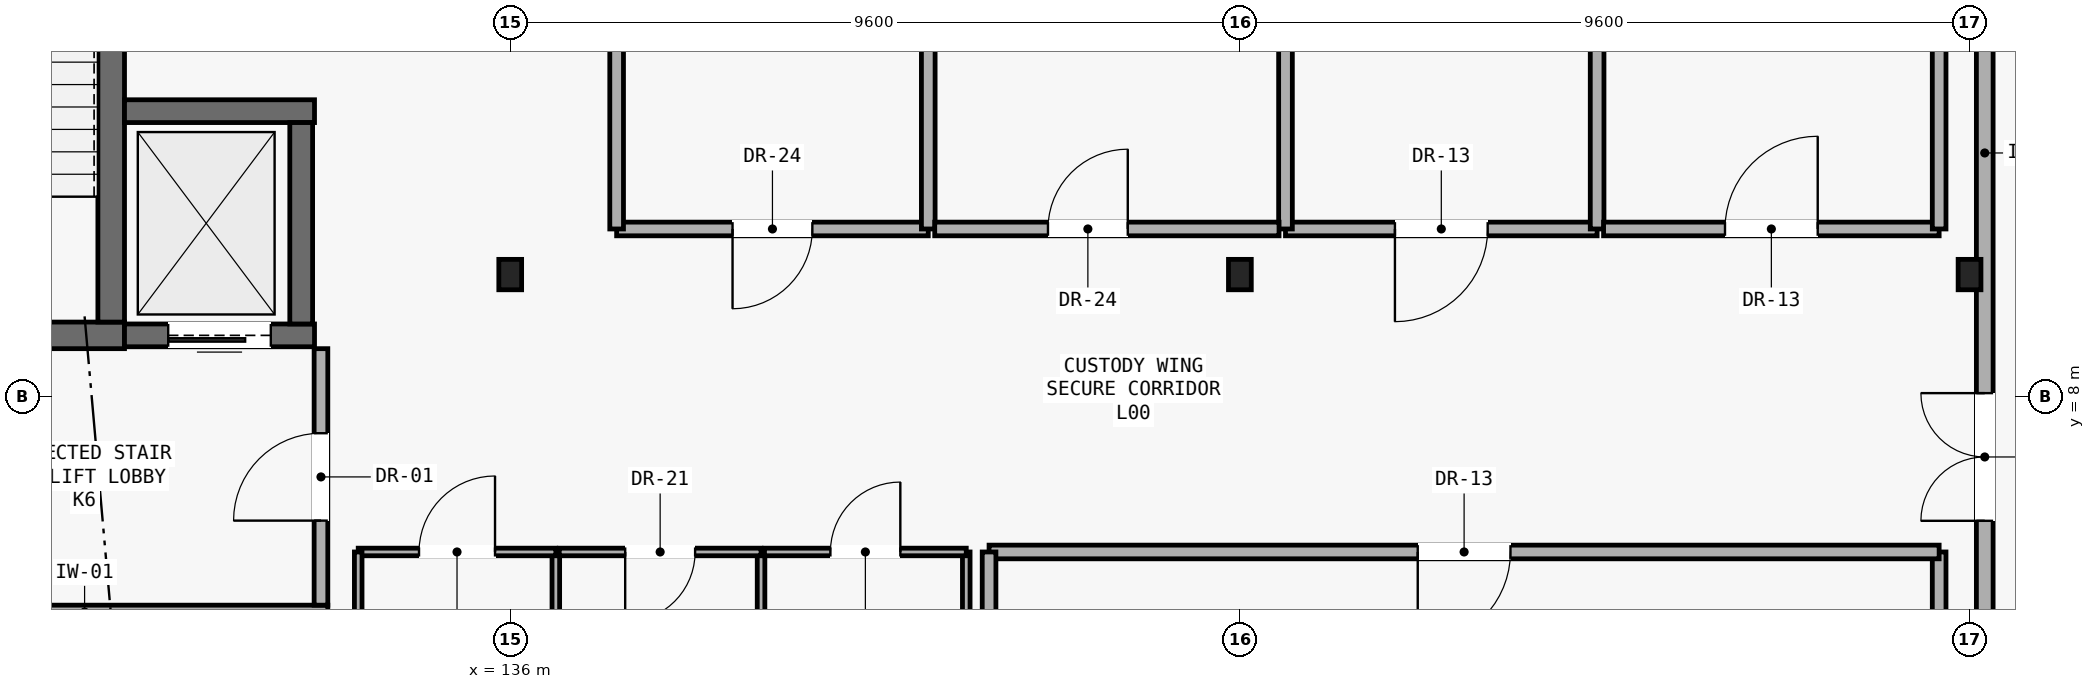
"""IFC4 building model, lengths in metres.
Left out: names, types, materials, properties, quantities, classifications, styles, units other than length and angle.
Written with IfcOpenShell. Run it as: python <this file> out.ifc"""

import sys

from ifc_helpers import new_model, si_unit, direction, frame, frame_2d, origin, origin_2d, place, context, subcontext, project, spatial, rectangle, i_section, extrude, element, fill, save


model = new_model("IFC4")
c1 = context("Model", 3, precision=1e-05, world=origin(), true_north=direction((0.0, 1.0)))
c2 = subcontext(c1, "Body", "Model", "MODEL_VIEW")
j1 = project(units=[si_unit("LENGTHUNIT", "METRE"), si_unit("PLANEANGLEUNIT", "RADIAN")], contexts=[c1])
p1 = place(None, origin())
s1 = spatial("IfcSite", under=j1, at=p1, CompositionType="ELEMENT")
p2 = place(p1, origin())
s2 = spatial("IfcBuilding", under=s1, at=p2, CompositionType="ELEMENT")
p3 = place(p2, origin())
s3 = spatial("IfcBuildingStorey", under=s2, at=p3, CompositionType="ELEMENT", Elevation=0.0)
for number, where, z_axis, x_axis in (
    (1, (136.0, 9.6, -0.27), (0.0, 0.0, 1.0), (1.0, 0.0, 0.0)),
    (2, (145.6, 9.6, -0.27), (0.0, 0.0, 1.0), (1.0, 0.0, 0.0)),
    (3, (155.2, 9.6, -0.27), (0.0, 0.0, 1.0), (1.0, 0.0, 0.0)),
):
    element("IfcColumn", number, at=place(p3, frame(where, z_axis=z_axis, x_axis=x_axis)), inside=s3, PredefinedType="COLUMN", context=c2, shape_type="SweptSolid", body=[
        extrude(i_section(OverallWidth=0.3, OverallDepth=0.4, WebThickness=0.013, FlangeThickness=0.024, FilletRadius=0.027, at=origin_2d()), origin(), (0.0, 0.0, 1.0), 5.52),
    ])
p4 = place(p3, frame((127.025, 8.8, -0.27), z_axis=(0.0, 0.0, 1.0), x_axis=(1.0, 0.0, 0.0)))
e4 = element("IfcWall", 4, at=p4, inside=s3, PredefinedType="SHEAR", context=c2, shape_type="SweptSolid", body=[
    extrude(rectangle(XDim=3.9, YDim=0.35, at=frame_2d((1.95, 0.0))), origin(), (0.0, 0.0, 1.0), 5.27),
])
p5 = place(p4, frame((1.125, 0.0, 0.27)))
e5 = element("IfcOpeningElement", 5, at=p5, cuts=e4, PredefinedType="OPENING", context=c2, shape_type="SweptSolid", body=[
    extrude(rectangle(XDim=1.3, YDim=2.15, at=frame_2d((0.65, 1.075))), frame((0.0, 0.185, 0.0), z_axis=(0.0, -1.0, 0.0), x_axis=(1.0, 0.0, 0.0)), (0.0, 0.0, 1.0), 0.37),
])
p6 = place(p3, frame((130.75, 8.975, -0.27), z_axis=(0.0, 0.0, 1.0), x_axis=(0.0, 1.0, 0.0)))
e6 = element("IfcWall", 6, at=p6, inside=s3, PredefinedType="SHEAR", context=c2, shape_type="SweptSolid", body=[
    extrude(rectangle(XDim=7.6, YDim=0.35, at=frame_2d((3.8, 0.0))), origin(), (0.0, 0.0, 1.0), 5.27),
])
p7 = place(p3, frame((130.925, 8.8, -0.27), z_axis=(0.0, 0.0, 1.0), x_axis=(1.0, 0.0, 0.0)))
e7 = element("IfcWall", 7, at=p7, inside=s3, PredefinedType="SHEAR", context=c2, shape_type="SweptSolid", body=[
    extrude(rectangle(XDim=2.5, YDim=0.3, at=frame_2d((1.25, 0.0))), origin(), (0.0, 0.0, 1.0), 5.27),
])
p8 = place(p7, frame((0.575, 0.0, 0.27)))
e8 = element("IfcOpeningElement", 8, at=p8, cuts=e7, PredefinedType="OPENING", context=c2, shape_type="SweptSolid", body=[
    extrude(rectangle(XDim=1.35, YDim=2.15, at=frame_2d((0.675, 1.075))), frame((0.0, 0.16, 0.0), z_axis=(0.0, -1.0, 0.0), x_axis=(1.0, 0.0, 0.0)), (0.0, 0.0, 1.0), 0.32),
])
p9 = place(p3, frame((130.925, 11.75, -0.27), z_axis=(0.0, 0.0, 1.0), x_axis=(1.0, 0.0, 0.0)))
e9 = element("IfcWall", 9, at=p9, inside=s3, PredefinedType="SHEAR", context=c2, shape_type="SweptSolid", body=[
    extrude(rectangle(XDim=2.5, YDim=0.3, at=frame_2d((1.25, 0.0))), origin(), (0.0, 0.0, 1.0), 5.27),
])
p10 = place(p3, frame((133.25, 8.95, -0.27), z_axis=(0.0, 0.0, 1.0), x_axis=(0.0, 1.0, 0.0)))
e10 = element("IfcWall", 10, at=p10, inside=s3, PredefinedType="SHEAR", context=c2, shape_type="SweptSolid", body=[
    extrude(rectangle(XDim=2.65, YDim=0.3, at=frame_2d((1.325, 0.0))), origin(), (0.0, 0.0, 1.0), 5.27),
])
p11 = place(p3, frame((127.2, 5.16, 0.0), z_axis=(0.0, 0.0, 1.0), x_axis=(1.0, 0.0, 0.0)))
e11 = element("IfcWall", 11, at=p11, inside=s3, PredefinedType="PARTITIONING", context=c2, shape_type="SweptSolid", body=[
    extrude(rectangle(XDim=6.4, YDim=0.18, at=frame_2d((3.2, 0.0))), origin(), (0.0, 0.0, 1.0), 5.0),
])
p12 = place(p3, frame((133.51, 5.25, 0.0), z_axis=(0.0, 0.0, 1.0), x_axis=(0.0, 1.0, 0.0)))
e12 = element("IfcWall", 12, at=p12, inside=s3, PredefinedType="PARTITIONING", context=c2, shape_type="SweptSolid", body=[
    extrude(rectangle(XDim=3.375, YDim=0.18, at=frame_2d((1.688, 0.0))), origin(), (0.0, 0.0, 1.0), 5.0),
])
p13 = place(p12, frame((1.113, 0.0, 0.0)))
e13 = element("IfcOpeningElement", 13, at=p13, cuts=e12, PredefinedType="OPENING", context=c2, shape_type="SweptSolid", body=[
    extrude(rectangle(XDim=1.15, YDim=2.15, at=frame_2d((0.575, 1.075))), frame((0.0, 0.1, 0.0), z_axis=(0.0, -1.0, 0.0), x_axis=(1.0, 0.0, 0.0)), (0.0, 0.0, 1.0), 0.2),
])
p14 = place(p3, frame((155.4, 22.215, 0.0), z_axis=(0.0, 0.0, 1.0), x_axis=(0.0, -1.0, 0.0)))
e14 = element("IfcWall", 14, at=p14, inside=s3, PredefinedType="PARTITIONING", context=c2, shape_type="SweptSolid", body=[
    extrude(rectangle(XDim=22.03, YDim=0.22, at=frame_2d((11.015, 0.0))), origin(), (0.0, 0.0, 1.0), 4.54),
])
p15 = place(p14, frame((14.175, 0.0, 0.0)))
e15 = element("IfcOpeningElement", 15, at=p15, cuts=e14, PredefinedType="OPENING", context=c2, shape_type="SweptSolid", body=[
    extrude(rectangle(XDim=1.68, YDim=2.2, at=frame_2d((0.84, 1.1))), frame((0.0, 0.12, 0.0), z_axis=(0.0, -1.0, 0.0), x_axis=(1.0, 0.0, 0.0)), (0.0, 0.0, 1.0), 0.24),
])
p16 = place(p3, frame((154.8, 0.185, 0.0), z_axis=(0.0, 0.0, 1.0), x_axis=(0.0, 1.0, 0.0)))
e16 = element("IfcWall", 16, at=p16, inside=s3, PredefinedType="PARTITIONING", context=c2, shape_type="SweptSolid", body=[
    extrude(rectangle(XDim=5.765, YDim=0.18, at=frame_2d((2.882, 0.0))), origin(), (0.0, 0.0, 1.0), 5.0),
])
p17 = place(p3, frame((154.8, 5.95, 0.0), z_axis=(0.0, 0.0, 1.0), x_axis=(-1.0, 0.0, 0.0)))
e17 = element("IfcWall", 17, at=p17, inside=s3, PredefinedType="PARTITIONING", context=c2, shape_type="SweptSolid", body=[
    extrude(rectangle(XDim=12.5, YDim=0.18, at=frame_2d((6.25, 0.0))), origin(), (0.0, 0.0, 1.0), 5.0),
])
p18 = place(p17, frame((5.64, 0.0, 0.0)))
e18 = element("IfcOpeningElement", 18, at=p18, cuts=e17, PredefinedType="OPENING", context=c2, shape_type="SweptSolid", body=[
    extrude(rectangle(XDim=1.22, YDim=2.1, at=frame_2d((0.61, 1.05))), frame((0.0, 0.1, 0.0), z_axis=(0.0, -1.0, 0.0), x_axis=(1.0, 0.0, 0.0)), (0.0, 0.0, 1.0), 0.2),
])
p19 = place(p3, frame((142.3, 5.95, 0.0), z_axis=(0.0, 0.0, 1.0), x_axis=(0.0, -1.0, 0.0)))
e19 = element("IfcWall", 19, at=p19, inside=s3, PredefinedType="PARTITIONING", context=c2, shape_type="SweptSolid", body=[
    extrude(rectangle(XDim=5.765, YDim=0.18, at=frame_2d((2.882, 0.0))), origin(), (0.0, 0.0, 1.0), 5.0),
])
p20 = place(p3, frame((146.2, 10.2, 0.0), z_axis=(0.0, 0.0, 1.0), x_axis=(1.0, 0.0, 0.0)))
e20 = element("IfcWall", 20, at=p20, inside=s3, PredefinedType="PARTITIONING", context=c2, shape_type="SweptSolid", body=[
    extrude(rectangle(XDim=4.1, YDim=0.18, at=frame_2d((2.05, 0.0))), origin(), (0.0, 0.0, 1.0), 5.0),
])
p21 = place(p20, frame((1.44, 0.0, 0.0)))
e21 = element("IfcOpeningElement", 21, at=p21, cuts=e20, PredefinedType="OPENING", context=c2, shape_type="SweptSolid", body=[
    extrude(rectangle(XDim=1.22, YDim=2.1, at=frame_2d((0.61, 1.05))), frame((0.0, 0.1, 0.0), z_axis=(0.0, -1.0, 0.0), x_axis=(1.0, 0.0, 0.0)), (0.0, 0.0, 1.0), 0.2),
])
for number, where, z_axis, x_axis in (
    (22, (150.3, 10.2, 0.0), (0.0, 0.0, 1.0), (0.0, 1.0, 0.0)),
    (23, (146.2, 22.215, 0.0), (0.0, 0.0, 1.0), (0.0, -1.0, 0.0)),
):
    element("IfcWall", number, at=place(p3, frame(where, z_axis=z_axis, x_axis=x_axis)), inside=s3, PredefinedType="PARTITIONING", context=c2, shape_type="SweptSolid", body=[
        extrude(rectangle(XDim=12.015, YDim=0.18, at=frame_2d((6.008, 0.0))), origin(), (0.0, 0.0, 1.0), 5.0),
    ])
p22 = place(p3, frame((150.385, 10.2, 0.0), z_axis=(0.0, 0.0, 1.0), x_axis=(1.0, 0.0, 0.0)))
e24 = element("IfcWall", 24, at=p22, inside=s3, PredefinedType="PARTITIONING", context=c2, shape_type="SweptSolid", body=[
    extrude(rectangle(XDim=4.415, YDim=0.18, at=frame_2d((2.208, 0.0))), origin(), (0.0, 0.0, 1.0), 5.0),
])
p23 = place(p22, frame((1.597, 0.0, 0.0)))
e25 = element("IfcOpeningElement", 25, at=p23, cuts=e24, PredefinedType="OPENING", context=c2, shape_type="SweptSolid", body=[
    extrude(rectangle(XDim=1.22, YDim=2.1, at=frame_2d((0.61, 1.05))), frame((0.0, 0.1, 0.0), z_axis=(0.0, -1.0, 0.0), x_axis=(1.0, 0.0, 0.0)), (0.0, 0.0, 1.0), 0.2),
])
p24 = place(p3, frame((154.8, 10.2, 0.0), z_axis=(0.0, 0.0, 1.0), x_axis=(0.0, 1.0, 0.0)))
e26 = element("IfcWall", 26, at=p24, inside=s3, PredefinedType="PARTITIONING", context=c2, shape_type="SweptSolid", body=[
    extrude(rectangle(XDim=12.015, YDim=0.18, at=frame_2d((6.008, 0.0))), origin(), (0.0, 0.0, 1.0), 5.0),
])
p25 = place(p3, frame((137.4, 10.2, 0.0), z_axis=(0.0, 0.0, 1.0), x_axis=(1.0, 0.0, 0.0)))
e27 = element("IfcWall", 27, at=p25, inside=s3, PredefinedType="PARTITIONING", context=c2, shape_type="SweptSolid", body=[
    extrude(rectangle(XDim=4.1, YDim=0.18, at=frame_2d((2.05, 0.0))), origin(), (0.0, 0.0, 1.0), 5.0),
])
p26 = place(p25, frame((1.525, 0.0, 0.0)))
e28 = element("IfcOpeningElement", 28, at=p26, cuts=e27, PredefinedType="OPENING", context=c2, shape_type="SweptSolid", body=[
    extrude(rectangle(XDim=1.05, YDim=2.1, at=frame_2d((0.525, 1.05))), frame((0.0, 0.1, 0.0), z_axis=(0.0, -1.0, 0.0), x_axis=(1.0, 0.0, 0.0)), (0.0, 0.0, 1.0), 0.2),
])
for number, where, z_axis, x_axis in (
    (29, (141.5, 10.2, 0.0), (0.0, 0.0, 1.0), (0.0, 1.0, 0.0)),
    (30, (137.4, 22.215, 0.0), (0.0, 0.0, 1.0), (0.0, -1.0, 0.0)),
):
    element("IfcWall", number, at=place(p3, frame(where, z_axis=z_axis, x_axis=x_axis)), inside=s3, PredefinedType="PARTITIONING", context=c2, shape_type="SweptSolid", body=[
        extrude(rectangle(XDim=12.015, YDim=0.18, at=frame_2d((6.008, 0.0))), origin(), (0.0, 0.0, 1.0), 5.0),
    ])
p27 = place(p3, frame((141.585, 10.2, 0.0), z_axis=(0.0, 0.0, 1.0), x_axis=(1.0, 0.0, 0.0)))
e31 = element("IfcWall", 31, at=p27, inside=s3, PredefinedType="PARTITIONING", context=c2, shape_type="SweptSolid", body=[
    extrude(rectangle(XDim=4.53, YDim=0.18, at=frame_2d((2.265, 0.0))), origin(), (0.0, 0.0, 1.0), 5.0),
])
p28 = place(p27, frame((1.49, 0.0, 0.0)))
e32 = element("IfcOpeningElement", 32, at=p28, cuts=e31, PredefinedType="OPENING", context=c2, shape_type="SweptSolid", body=[
    extrude(rectangle(XDim=1.05, YDim=2.1, at=frame_2d((0.525, 1.05))), frame((0.0, 0.1, 0.0), z_axis=(0.0, -1.0, 0.0), x_axis=(1.0, 0.0, 0.0)), (0.0, 0.0, 1.0), 0.2),
])
p29 = place(p3, frame((136.6, 2.65, 0.0), z_axis=(0.0, 0.0, 1.0), x_axis=(0.0, 1.0, 0.0)))
e33 = element("IfcWall", 33, at=p29, inside=s3, PredefinedType="PARTITIONING", context=c2, shape_type="SweptSolid", body=[
    extrude(rectangle(XDim=3.3, YDim=0.1, at=frame_2d((1.65, 0.0))), origin(), (0.0, 0.0, 1.0), 5.0),
])
p30 = place(p3, frame((136.6, 5.95, 0.0), z_axis=(0.0, 0.0, 1.0), x_axis=(-1.0, 0.0, 0.0)))
e34 = element("IfcWall", 34, at=p30, inside=s3, PredefinedType="PARTITIONING", context=c2, shape_type="SweptSolid", body=[
    extrude(rectangle(XDim=2.6, YDim=0.1, at=frame_2d((1.3, 0.0))), origin(), (0.0, 0.0, 1.0), 5.0),
])
p31 = place(p30, frame((0.8, 0.0, 0.0)))
e35 = element("IfcOpeningElement", 35, at=p31, cuts=e34, PredefinedType="OPENING", context=c2, shape_type="SweptSolid", body=[
    extrude(rectangle(XDim=1.0, YDim=2.08, at=frame_2d((0.5, 1.04))), frame((0.0, 0.06, 0.0), z_axis=(0.0, -1.0, 0.0), x_axis=(1.0, 0.0, 0.0)), (0.0, 0.0, 1.0), 0.12),
])
for number, where, z_axis, x_axis in (
    (36, (134.0, 5.95, 0.0), (0.0, 0.0, 1.0), (0.0, -1.0, 0.0)),
    (37, (139.3, 2.65, 0.0), (0.0, 0.0, 1.0), (0.0, 1.0, 0.0)),
):
    element("IfcWall", number, at=place(p3, frame(where, z_axis=z_axis, x_axis=x_axis)), inside=s3, PredefinedType="PARTITIONING", context=c2, shape_type="SweptSolid", body=[
        extrude(rectangle(XDim=3.3, YDim=0.1, at=frame_2d((1.65, 0.0))), origin(), (0.0, 0.0, 1.0), 5.0),
    ])
p32 = place(p3, frame((139.3, 5.95, 0.0), z_axis=(0.0, 0.0, 1.0), x_axis=(-1.0, 0.0, 0.0)))
e38 = element("IfcWall", 38, at=p32, inside=s3, PredefinedType="PARTITIONING", context=c2, shape_type="SweptSolid", body=[
    extrude(rectangle(XDim=2.655, YDim=0.1, at=frame_2d((1.328, 0.0))), origin(), (0.0, 0.0, 1.0), 5.0),
])
p33 = place(p32, frame((0.867, 0.0, 0.0)))
e39 = element("IfcOpeningElement", 39, at=p33, cuts=e38, PredefinedType="OPENING", context=c2, shape_type="SweptSolid", body=[
    extrude(rectangle(XDim=0.92, YDim=2.08, at=frame_2d((0.46, 1.04))), frame((0.0, 0.06, 0.0), z_axis=(0.0, -1.0, 0.0), x_axis=(1.0, 0.0, 0.0)), (0.0, 0.0, 1.0), 0.12),
])
p34 = place(p3, frame((142.0, 2.65, 0.0), z_axis=(0.0, 0.0, 1.0), x_axis=(0.0, 1.0, 0.0)))
e40 = element("IfcWall", 40, at=p34, inside=s3, PredefinedType="PARTITIONING", context=c2, shape_type="SweptSolid", body=[
    extrude(rectangle(XDim=3.3, YDim=0.1, at=frame_2d((1.65, 0.0))), origin(), (0.0, 0.0, 1.0), 5.0),
])
p35 = place(p3, frame((142.0, 5.95, 0.0), z_axis=(0.0, 0.0, 1.0), x_axis=(-1.0, 0.0, 0.0)))
e41 = element("IfcWall", 41, at=p35, inside=s3, PredefinedType="PARTITIONING", context=c2, shape_type="SweptSolid", body=[
    extrude(rectangle(XDim=2.655, YDim=0.1, at=frame_2d((1.328, 0.0))), origin(), (0.0, 0.0, 1.0), 5.0),
])
p36 = place(p35, frame((0.867, 0.0, 0.0)))
e42 = element("IfcOpeningElement", 42, at=p36, cuts=e41, PredefinedType="OPENING", context=c2, shape_type="SweptSolid", body=[
    extrude(rectangle(XDim=0.92, YDim=2.08, at=frame_2d((0.46, 1.04))), frame((0.0, 0.06, 0.0), z_axis=(0.0, -1.0, 0.0), x_axis=(1.0, 0.0, 0.0)), (0.0, 0.0, 1.0), 0.12),
])
p37 = place(p8, frame((1.35, 0.0, 0.0), z_axis=(0.0, 0.0, 1.0), x_axis=(-1.0, 0.0, 0.0)))
e43 = element("IfcDoor", 43, at=p37, inside=s3, OperationType="SLIDING_TO_RIGHT", PredefinedType="DOOR", context=c2, shape_type="SweptSolid", body=[
    extrude(rectangle(XDim=1.35, YDim=2.15, at=frame_2d((0.675, 1.075))), frame((0.0, 0.025, 0.0), z_axis=(0.0, -1.0, 0.0), x_axis=(1.0, 0.0, 0.0)), (0.0, 0.0, 1.0), 0.05),
])
fill(e8, e43)
p38 = place(p13, origin())
e44 = element("IfcDoor", 44, at=p38, inside=s3, OperationType="SINGLE_SWING_LEFT", PredefinedType="DOOR", context=c2, shape_type="SweptSolid", body=[
    extrude(rectangle(XDim=1.15, YDim=2.15, at=frame_2d((0.575, 1.075))), frame((0.0, 0.025, 0.0), z_axis=(0.0, -1.0, 0.0), x_axis=(1.0, 0.0, 0.0)), (0.0, 0.0, 1.0), 0.05),
])
fill(e13, e44)
p39 = place(p15, frame((1.68, 0.0, 0.0), z_axis=(0.0, 0.0, 1.0), x_axis=(-1.0, 0.0, 0.0)))
e45 = element("IfcDoor", 45, at=p39, inside=s3, OperationType="DOUBLE_DOOR_SINGLE_SWING", PredefinedType="DOOR", context=c2, shape_type="SweptSolid", body=[
    extrude(rectangle(XDim=1.68, YDim=2.2, at=frame_2d((0.84, 1.1))), frame((0.0, 0.025, 0.0), z_axis=(0.0, -1.0, 0.0), x_axis=(1.0, 0.0, 0.0)), (0.0, 0.0, 1.0), 0.05),
])
fill(e15, e45)
p40 = place(p18, origin())
e46 = element("IfcDoor", 46, at=p40, inside=s3, OperationType="SINGLE_SWING_RIGHT", PredefinedType="DOOR", context=c2, shape_type="SweptSolid", body=[
    extrude(rectangle(XDim=1.22, YDim=2.1, at=frame_2d((0.61, 1.05))), frame((0.0, 0.025, 0.0), z_axis=(0.0, -1.0, 0.0), x_axis=(1.0, 0.0, 0.0)), (0.0, 0.0, 1.0), 0.05),
])
fill(e18, e46)
p41 = place(p21, frame((1.22, 0.0, 0.0), z_axis=(0.0, 0.0, 1.0), x_axis=(-1.0, 0.0, 0.0)))
e47 = element("IfcDoor", 47, at=p41, inside=s3, OperationType="SINGLE_SWING_LEFT", PredefinedType="DOOR", context=c2, shape_type="SweptSolid", body=[
    extrude(rectangle(XDim=1.22, YDim=2.1, at=frame_2d((0.61, 1.05))), frame((0.0, 0.025, 0.0), z_axis=(0.0, -1.0, 0.0), x_axis=(1.0, 0.0, 0.0)), (0.0, 0.0, 1.0), 0.05),
])
fill(e21, e47)
p42 = place(p23, origin())
e48 = element("IfcDoor", 48, at=p42, inside=s3, OperationType="SINGLE_SWING_RIGHT", PredefinedType="DOOR", context=c2, shape_type="SweptSolid", body=[
    extrude(rectangle(XDim=1.22, YDim=2.1, at=frame_2d((0.61, 1.05))), frame((0.0, 0.025, 0.0), z_axis=(0.0, -1.0, 0.0), x_axis=(1.0, 0.0, 0.0)), (0.0, 0.0, 1.0), 0.05),
])
fill(e25, e48)
p43 = place(p26, frame((1.05, 0.0, 0.0), z_axis=(0.0, 0.0, 1.0), x_axis=(-1.0, 0.0, 0.0)))
e49 = element("IfcDoor", 49, at=p43, inside=s3, OperationType="SINGLE_SWING_LEFT", PredefinedType="DOOR", context=c2, shape_type="SweptSolid", body=[
    extrude(rectangle(XDim=1.05, YDim=2.1, at=frame_2d((0.525, 1.05))), frame((0.0, 0.025, 0.0), z_axis=(0.0, -1.0, 0.0), x_axis=(1.0, 0.0, 0.0)), (0.0, 0.0, 1.0), 0.05),
])
fill(e28, e49)
p44 = place(p28, origin())
e50 = element("IfcDoor", 50, at=p44, inside=s3, OperationType="SINGLE_SWING_RIGHT", PredefinedType="DOOR", context=c2, shape_type="SweptSolid", body=[
    extrude(rectangle(XDim=1.05, YDim=2.1, at=frame_2d((0.525, 1.05))), frame((0.0, 0.025, 0.0), z_axis=(0.0, -1.0, 0.0), x_axis=(1.0, 0.0, 0.0)), (0.0, 0.0, 1.0), 0.05),
])
fill(e32, e50)
p45 = place(p31, frame((1.0, 0.0, 0.0), z_axis=(0.0, 0.0, 1.0), x_axis=(-1.0, 0.0, 0.0)))
e51 = element("IfcDoor", 51, at=p45, inside=s3, OperationType="SINGLE_SWING_LEFT", PredefinedType="DOOR", context=c2, shape_type="SweptSolid", body=[
    extrude(rectangle(XDim=1.0, YDim=2.08, at=frame_2d((0.5, 1.04))), frame((0.0, 0.025, 0.0), z_axis=(0.0, -1.0, 0.0), x_axis=(1.0, 0.0, 0.0)), (0.0, 0.0, 1.0), 0.05),
])
fill(e35, e51)
p46 = place(p33, origin())
e52 = element("IfcDoor", 52, at=p46, inside=s3, OperationType="SINGLE_SWING_RIGHT", PredefinedType="DOOR", context=c2, shape_type="SweptSolid", body=[
    extrude(rectangle(XDim=0.92, YDim=2.08, at=frame_2d((0.46, 1.04))), frame((0.0, 0.025, 0.0), z_axis=(0.0, -1.0, 0.0), x_axis=(1.0, 0.0, 0.0)), (0.0, 0.0, 1.0), 0.05),
])
fill(e39, e52)
p47 = place(p36, frame((0.92, 0.0, 0.0), z_axis=(0.0, 0.0, 1.0), x_axis=(-1.0, 0.0, 0.0)))
e53 = element("IfcDoor", 53, at=p47, inside=s3, OperationType="SINGLE_SWING_LEFT", PredefinedType="DOOR", context=c2, shape_type="SweptSolid", body=[
    extrude(rectangle(XDim=0.92, YDim=2.08, at=frame_2d((0.46, 1.04))), frame((0.0, 0.025, 0.0), z_axis=(0.0, -1.0, 0.0), x_axis=(1.0, 0.0, 0.0)), (0.0, 0.0, 1.0), 0.05),
])
fill(e42, e53)
save(model, sys.argv[1])
